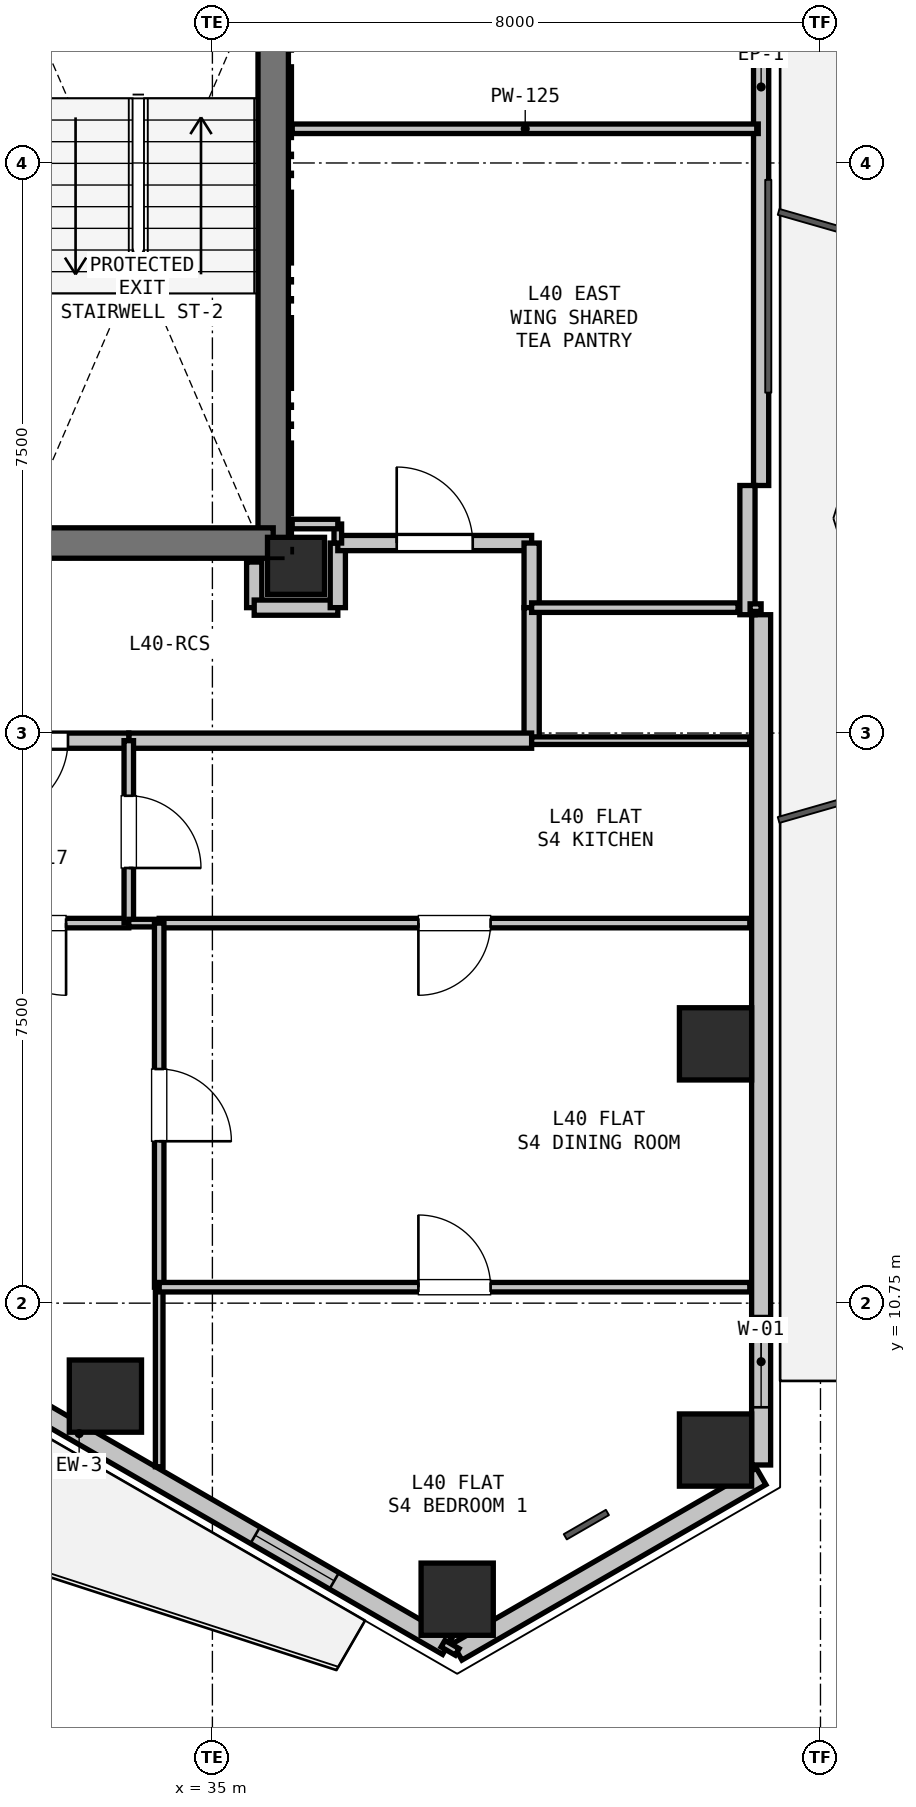
"""IFC4 building model, lengths in metres.
Left out: names, types, materials, properties, quantities, classifications, styles, units other than length and angle.
Written with IfcOpenShell. Run it as: python <this file> out.ifc"""

import sys

from ifc_helpers import new_model, si_unit, direction, frame, frame_2d, origin, origin_2d, place, context, subcontext, project, spatial, rectangle, hollow_rectangle, extrude, element, fill, save


model = new_model("IFC4")
c1 = context("Model", 3, precision=1e-05, world=origin(), true_north=direction((0.0, 1.0)))
c2 = subcontext(c1, "Body", "Model", "MODEL_VIEW")
j1 = project(units=[si_unit("LENGTHUNIT", "METRE"), si_unit("PLANEANGLEUNIT", "RADIAN")], contexts=[c1])
p1 = place(None, origin())
s1 = spatial("IfcSite", under=j1, at=p1, CompositionType="ELEMENT")
p2 = place(p1, origin())
s2 = spatial("IfcBuilding", under=s1, at=p2, CompositionType="ELEMENT")
p3 = place(p2, frame((0.0, 0.0, 144.3)))
s3 = spatial("IfcBuildingStorey", under=s2, at=p3, CompositionType="ELEMENT", Elevation=144.3)
p4 = place(p3, frame((36.1, 20.45, 0.0), z_axis=(0.0, 0.0, 1.0), x_axis=(1.0, 0.0, 0.0)))
e1 = element("IfcColumn", 1, at=p4, inside=s3, PredefinedType="COLUMN", context=c2, shape_type="SweptSolid", body=[
    extrude(rectangle(XDim=0.75, YDim=0.75, at=origin_2d()), origin(), (0.0, 0.0, 1.0), 3.3),
])
for number, where, z_axis, x_axis in (
    (2, (41.619, 14.161, 0.0), (0.0, 0.0, 1.0), (1.0, 0.0, 0.0)),
    (3, (41.619, 8.817, 0.0), (0.0, 0.0, 1.0), (1.0, 0.0, 0.0)),
    (4, (38.22, 6.855, 0.0), (0.0, 0.0, 1.0), (1.0, 0.0, 0.0)),
    (5, (33.593, 9.527, 0.0), (0.0, 0.0, 1.0), (1.0, 0.0, 0.0)),
):
    element("IfcColumn", number, at=place(p3, frame(where, z_axis=z_axis, x_axis=x_axis)), inside=s3, PredefinedType="COLUMN", context=c2, shape_type="SweptSolid", body=[
        extrude(hollow_rectangle(XDim=0.95, YDim=0.95, WallThickness=0.028, at=origin_2d()), origin(), (0.0, 0.0, 1.0), 3.3),
    ])
p5 = place(p3, frame((42.219, 8.471, 0.0), z_axis=(0.0, 0.0, 1.0), x_axis=(-0.866035021055, -0.499983342029, 0.0)))
e6 = element("IfcWall", 6, at=p5, inside=s3, PredefinedType="SOLIDWALL", context=c2, shape_type="SweptSolid", body=[
    extrude(rectangle(XDim=4.617, YDim=0.25, at=frame_2d((2.309, 0.0))), origin(), (0.0, 0.0, 1.0), 2.68),
])
p6 = place(p3, frame((42.219, 31.993, 0.0), z_axis=(0.0, 0.0, 1.0), x_axis=(0.0, -1.0, 0.0)))
e7 = element("IfcWall", 7, at=p6, inside=s3, PredefinedType="PARAPET", context=c2, shape_type="SweptSolid", body=[
    extrude(rectangle(XDim=10.486, YDim=0.2, at=frame_2d((5.243, 0.0))), origin(), (0.0, 0.0, 1.0), 0.2),
])
p7 = place(p3, frame((42.219, 19.807, 0.0), z_axis=(0.0, 0.0, 1.0), x_axis=(0.0, -1.0, 0.0)))
e8 = element("IfcWall", 8, at=p7, inside=s3, PredefinedType="SOLIDWALL", context=c2, shape_type="SweptSolid", body=[
    extrude(rectangle(XDim=11.186, YDim=0.25, at=frame_2d((5.593, 0.0))), origin(), (0.0, 0.0, 1.0), 2.68),
])
p8 = place(p7, frame((9.227, 0.0, 0.9)))
e9 = element("IfcOpeningElement", 9, at=p8, cuts=e8, PredefinedType="OPENING", context=c2, shape_type="SweptSolid", body=[
    extrude(rectangle(XDim=1.2, YDim=1.4, at=frame_2d((0.6, 0.7))), frame((0.0, 0.135, 0.0), z_axis=(0.0, -1.0, 0.0), x_axis=(1.0, 0.0, 0.0)), (0.0, 0.0, 1.0), 0.27),
])
p9 = place(p3, frame((42.039, 21.507, 0.0), z_axis=(0.0, 0.0, 1.0), x_axis=(0.0, -1.0, 0.0)))
e10 = element("IfcWall", 10, at=p9, inside=s3, PredefinedType="PARAPET", context=c2, shape_type="SweptSolid", body=[
    extrude(rectangle(XDim=1.7, YDim=0.2, at=frame_2d((0.85, 0.0))), origin(), (0.0, 0.0, 1.0), 2.68),
])
p10 = place(p3, frame((38.091, 6.237, 0.0), z_axis=(0.0, 0.0, 1.0), x_axis=(-0.86602239209, 0.500005216371, 0.0)))
e11 = element("IfcWall", 11, at=p10, inside=s3, PredefinedType="SOLIDWALL", context=c2, shape_type="SweptSolid", body=[
    extrude(rectangle(XDim=11.186, YDim=0.25, at=frame_2d((5.593, 0.0))), origin(), (0.0, 0.0, 1.0), 2.68),
])
p11 = place(p10, frame((7.095, 0.0, 0.0)))
e12 = element("IfcOpeningElement", 12, at=p11, cuts=e11, PredefinedType="OPENING", context=c2, shape_type="SweptSolid", body=[
    extrude(rectangle(XDim=1.0, YDim=2.1, at=frame_2d((0.5, 1.05))), frame((0.0, 0.135, 0.0), z_axis=(0.0, -1.0, 0.0), x_axis=(1.0, 0.0, 0.0)), (0.0, 0.0, 1.0), 0.27),
])
p12 = place(p10, frame((1.718, 0.0, 0.9)))
e13 = element("IfcOpeningElement", 13, at=p12, cuts=e11, PredefinedType="OPENING", context=c2, shape_type="SweptSolid", body=[
    extrude(rectangle(XDim=1.2, YDim=1.4, at=frame_2d((0.6, 0.7))), frame((0.0, 0.135, 0.0), z_axis=(0.0, -1.0, 0.0), x_axis=(1.0, 0.0, 0.0)), (0.0, 0.0, 1.0), 0.27),
])
p13 = place(p3, frame((35.8, 28.1, 0.0), z_axis=(0.0, 0.0, 1.0), x_axis=(0.0, -1.0, 0.0)))
e14 = element("IfcWall", 14, at=p13, inside=s3, PredefinedType="SHEAR", context=c2, shape_type="SweptSolid", body=[
    extrude(rectangle(XDim=7.35, YDim=0.4, at=frame_2d((3.675, 0.0))), origin(), (0.0, 0.0, 1.0), 3.06),
])
p14 = place(p3, frame((35.8, 20.75, 0.0), z_axis=(0.0, 0.0, 1.0), x_axis=(-1.0, 0.0, 0.0)))
e15 = element("IfcWall", 15, at=p14, inside=s3, PredefinedType="SHEAR", context=c2, shape_type="SweptSolid", body=[
    extrude(rectangle(XDim=3.45, YDim=0.4, at=frame_2d((1.725, 0.0))), origin(), (0.0, 0.0, 1.0), 3.06),
])
p15 = place(p3, frame((35.55, 20.5, 0.0), z_axis=(0.0, 0.0, 1.0), x_axis=(0.0, -1.0, 0.0)))
e16 = element("IfcWall", 16, at=p15, inside=s3, PredefinedType="PARTITIONING", context=c2, shape_type="SweptSolid", body=[
    extrude(rectangle(XDim=0.6, YDim=0.2, at=frame_2d((0.3, 0.0))), origin(), (0.0, 0.0, 1.0), 2.585),
])
p16 = place(p3, frame((35.55, 19.9, 0.0), z_axis=(0.0, 0.0, 1.0), x_axis=(1.0, 0.0, 0.0)))
e17 = element("IfcWall", 17, at=p16, inside=s3, PredefinedType="PARTITIONING", context=c2, shape_type="SweptSolid", body=[
    extrude(rectangle(XDim=1.1, YDim=0.2, at=frame_2d((0.55, 0.0))), origin(), (0.0, 0.0, 1.0), 2.433),
])
p17 = place(p3, frame((36.65, 19.9, 0.0), z_axis=(0.0, 0.0, 1.0), x_axis=(0.0, 1.0, 0.0)))
e18 = element("IfcWall", 18, at=p17, inside=s3, PredefinedType="PARTITIONING", context=c2, shape_type="SweptSolid", body=[
    extrude(rectangle(XDim=0.85, YDim=0.2, at=frame_2d((0.425, 0.0))), origin(), (0.0, 0.0, 1.0), 3.06),
])
p18 = place(p3, frame((36.65, 20.75, 0.0), z_axis=(0.0, 0.0, 1.0), x_axis=(1.0, 0.0, 0.0)))
e19 = element("IfcWall", 19, at=p18, inside=s3, PredefinedType="PARTITIONING", context=c2, shape_type="SweptSolid", body=[
    extrude(rectangle(XDim=2.55, YDim=0.2, at=frame_2d((1.275, 0.0))), origin(), (0.0, 0.0, 1.0), 3.06),
])
p19 = place(p18, frame((0.775, 0.0, 0.0)))
e20 = element("IfcOpeningElement", 20, at=p19, cuts=e19, PredefinedType="OPENING", context=c2, shape_type="SweptSolid", body=[
    extrude(rectangle(XDim=1.0, YDim=2.15, at=frame_2d((0.5, 1.075))), frame((0.0, 0.11, 0.0), z_axis=(0.0, -1.0, 0.0), x_axis=(1.0, 0.0, 0.0)), (0.0, 0.0, 1.0), 0.22),
])
p20 = place(p3, frame((39.2, 20.75, 0.0), z_axis=(0.0, 0.0, 1.0), x_axis=(0.0, -1.0, 0.0)))
e21 = element("IfcWall", 21, at=p20, inside=s3, PredefinedType="PARTITIONING", context=c2, shape_type="SweptSolid", body=[
    extrude(rectangle(XDim=0.85, YDim=0.2, at=frame_2d((0.425, 0.0))), origin(), (0.0, 0.0, 1.0), 3.06),
])
p21 = place(p3, frame((39.2, 19.9, 0.0), z_axis=(0.0, 0.0, 1.0), x_axis=(0.0, -1.0, 0.0)))
e22 = element("IfcWall", 22, at=p21, inside=s3, PredefinedType="PARTITIONING", context=c2, shape_type="SweptSolid", body=[
    extrude(rectangle(XDim=1.75, YDim=0.2, at=frame_2d((0.875, 0.0))), origin(), (0.0, 0.0, 1.0), 3.06),
])
p22 = place(p3, frame((39.2, 18.15, 0.0), z_axis=(0.0, 0.0, 1.0), x_axis=(-1.0, 0.0, 0.0)))
e23 = element("IfcWall", 23, at=p22, inside=s3, PredefinedType="PARTITIONING", context=c2, shape_type="SweptSolid", body=[
    extrude(rectangle(XDim=5.3, YDim=0.2, at=frame_2d((2.65, 0.0))), origin(), (0.0, 0.0, 1.0), 2.433),
])
p23 = place(p3, frame((33.9, 18.15, 0.0), z_axis=(0.0, 0.0, 1.0), x_axis=(-1.0, 0.0, 0.0)))
e24 = element("IfcWall", 24, at=p23, inside=s3, PredefinedType="PARTITIONING", context=c2, shape_type="SweptSolid", body=[
    extrude(rectangle(XDim=2.6, YDim=0.2, at=frame_2d((1.3, 0.0))), origin(), (0.0, 0.0, 1.0), 3.06),
])
p24 = place(p23, frame((0.8, 0.0, 0.0)))
e25 = element("IfcOpeningElement", 25, at=p24, cuts=e24, PredefinedType="OPENING", context=c2, shape_type="SweptSolid", body=[
    extrude(rectangle(XDim=1.0, YDim=2.15, at=frame_2d((0.5, 1.075))), frame((0.0, 0.11, 0.0), z_axis=(0.0, -1.0, 0.0), x_axis=(1.0, 0.0, 0.0)), (0.0, 0.0, 1.0), 0.22),
])
p25 = place(p3, frame((33.9, 15.75, 0.0), z_axis=(0.0, 0.0, 1.0), x_axis=(-1.0, 0.0, 0.0)))
e26 = element("IfcWall", 26, at=p25, inside=s3, PredefinedType="PARTITIONING", context=c2, shape_type="SweptSolid", body=[
    extrude(rectangle(XDim=2.6, YDim=0.125, at=frame_2d((1.3, 0.0))), origin(), (0.0, 0.0, 1.0), 3.06),
])
p26 = place(p25, frame((0.825, 0.0, 0.0)))
e27 = element("IfcOpeningElement", 27, at=p26, cuts=e26, PredefinedType="OPENING", context=c2, shape_type="SweptSolid", body=[
    extrude(rectangle(XDim=0.95, YDim=2.1, at=frame_2d((0.475, 1.05))), frame((0.0, 0.073, 0.0), z_axis=(0.0, -1.0, 0.0), x_axis=(1.0, 0.0, 0.0)), (0.0, 0.0, 1.0), 0.145),
])
p27 = place(p3, frame((33.9, 18.15, 0.0), z_axis=(0.0, 0.0, 1.0), x_axis=(0.0, -1.0, 0.0)))
e28 = element("IfcWall", 28, at=p27, inside=s3, PredefinedType="PARTITIONING", context=c2, shape_type="SweptSolid", body=[
    extrude(rectangle(XDim=2.4, YDim=0.125, at=frame_2d((1.2, 0.0))), origin(), (0.0, 0.0, 1.0), 3.06),
])
p28 = place(p27, frame((0.725, 0.0, 0.0)))
e29 = element("IfcOpeningElement", 29, at=p28, cuts=e28, PredefinedType="OPENING", context=c2, shape_type="SweptSolid", body=[
    extrude(rectangle(XDim=0.95, YDim=2.1, at=frame_2d((0.475, 1.05))), frame((0.0, 0.073, 0.0), z_axis=(0.0, -1.0, 0.0), x_axis=(1.0, 0.0, 0.0)), (0.0, 0.0, 1.0), 0.145),
])
p29 = place(p3, frame((39.2, 18.15, 0.0), z_axis=(0.0, 0.0, 1.0), x_axis=(1.0, 0.0, 0.0)))
e30 = element("IfcWall", 30, at=p29, inside=s3, PredefinedType="PARTITIONING", context=c2, shape_type="SweptSolid", body=[
    extrude(rectangle(XDim=2.87, YDim=0.1, at=frame_2d((1.435, 0.0))), origin(), (0.0, 0.0, 1.0), 2.365),
])
p30 = place(p3, frame((42.07, 15.75, 0.0), z_axis=(0.0, 0.0, 1.0), x_axis=(-1.0, 0.0, 0.0)))
e31 = element("IfcWall", 31, at=p30, inside=s3, PredefinedType="PARTITIONING", context=c2, shape_type="SweptSolid", body=[
    extrude(rectangle(XDim=7.77, YDim=0.125, at=frame_2d((3.885, 0.0))), origin(), (0.0, 0.0, 1.0), 2.365),
])
p31 = place(p30, frame((3.41, 0.0, 0.0)))
e32 = element("IfcOpeningElement", 32, at=p31, cuts=e31, PredefinedType="OPENING", context=c2, shape_type="SweptSolid", body=[
    extrude(rectangle(XDim=0.95, YDim=2.1, at=frame_2d((0.475, 1.05))), frame((0.0, 0.073, 0.0), z_axis=(0.0, -1.0, 0.0), x_axis=(1.0, 0.0, 0.0)), (0.0, 0.0, 1.0), 0.145),
])
p32 = place(p3, frame((34.3, 15.75, 0.0), z_axis=(0.0, 0.0, 1.0), x_axis=(-1.0, 0.0, 0.0)))
e33 = element("IfcWall", 33, at=p32, inside=s3, PredefinedType="PARTITIONING", context=c2, shape_type="SweptSolid", body=[
    extrude(rectangle(XDim=0.4, YDim=0.1, at=frame_2d((0.2, 0.0))), origin(), (0.0, 0.0, 1.0), 3.06),
])
p33 = place(p3, frame((42.181, 26.2, 0.0), z_axis=(0.0, 0.0, 1.0), x_axis=(-1.0, 0.0, 0.0)))
e34 = element("IfcWall", 34, at=p33, inside=s3, PredefinedType="PARTITIONING", context=c2, shape_type="SweptSolid", body=[
    extrude(rectangle(XDim=6.131, YDim=0.125, at=frame_2d((3.065, 0.0))), origin(), (0.0, 0.0, 1.0), 2.365),
])
p34 = place(p3, frame((36.65, 20.75, 0.0), z_axis=(0.0, 0.0, 1.0), x_axis=(0.0, 1.0, 0.0)))
e35 = element("IfcWall", 35, at=p34, inside=s3, PredefinedType="PARTITIONING", context=c2, shape_type="SweptSolid", body=[
    extrude(rectangle(XDim=0.25, YDim=0.1, at=frame_2d((0.125, 0.0))), origin(), (0.0, 0.0, 1.0), 3.06),
])
p35 = place(p3, frame((36.65, 21.0, 0.0), z_axis=(0.0, 0.0, 1.0), x_axis=(-1.0, 0.0, 0.0)))
e36 = element("IfcWall", 36, at=p35, inside=s3, PredefinedType="PARTITIONING", context=c2, shape_type="SweptSolid", body=[
    extrude(rectangle(XDim=0.6, YDim=0.125, at=frame_2d((0.3, 0.0))), origin(), (0.0, 0.0, 1.0), 2.585),
])
p36 = place(p3, frame((42.219, 19.9, 0.0), z_axis=(0.0, 0.0, 1.0), x_axis=(-1.0, 0.0, 0.0)))
e37 = element("IfcWall", 37, at=p36, inside=s3, PredefinedType="PARTITIONING", context=c2, shape_type="SweptSolid", body=[
    extrude(rectangle(XDim=0.145, YDim=0.1, at=frame_2d((0.072, 0.0))), origin(), (0.0, 0.0, 1.0), 3.06),
])
p37 = place(p3, frame((41.915, 19.9, 0.0), z_axis=(0.0, 0.0, 1.0), x_axis=(-1.0, 0.0, 0.0)))
e38 = element("IfcWall", 38, at=p37, inside=s3, PredefinedType="PARTITIONING", context=c2, shape_type="SweptSolid", body=[
    extrude(rectangle(XDim=2.715, YDim=0.125, at=frame_2d((1.358, 0.0))), origin(), (0.0, 0.0, 1.0), 2.365),
])
p38 = place(p3, frame((34.3, 15.75, 0.0), z_axis=(0.0, 0.0, 1.0), x_axis=(0.0, -1.0, 0.0)))
e39 = element("IfcWall", 39, at=p38, inside=s3, PredefinedType="PARTITIONING", context=c2, shape_type="SweptSolid", body=[
    extrude(rectangle(XDim=4.79, YDim=0.125, at=frame_2d((2.395, 0.0))), origin(), (0.0, 0.0, 1.0), 3.06),
])
p39 = place(p38, frame((1.92, 0.0, 0.0)))
e40 = element("IfcOpeningElement", 40, at=p39, cuts=e39, PredefinedType="OPENING", context=c2, shape_type="SweptSolid", body=[
    extrude(rectangle(XDim=0.95, YDim=2.1, at=frame_2d((0.475, 1.05))), frame((0.0, 0.073, 0.0), z_axis=(0.0, -1.0, 0.0), x_axis=(1.0, 0.0, 0.0)), (0.0, 0.0, 1.0), 0.145),
])
p40 = place(p3, frame((34.3, 10.96, 0.0), z_axis=(0.0, 0.0, 1.0), x_axis=(0.0, -1.0, 0.0)))
e41 = element("IfcWall", 41, at=p40, inside=s3, PredefinedType="PARTITIONING", context=c2, shape_type="SweptSolid", body=[
    extrude(rectangle(XDim=2.362, YDim=0.1, at=frame_2d((1.181, 0.0))), origin(), (0.0, 0.0, 1.0), 2.724),
])
p41 = place(p3, frame((34.3, 10.96, 0.0), z_axis=(0.0, 0.0, 1.0), x_axis=(1.0, 0.0, 0.0)))
e42 = element("IfcWall", 42, at=p41, inside=s3, PredefinedType="PARTITIONING", context=c2, shape_type="SweptSolid", body=[
    extrude(rectangle(XDim=7.77, YDim=0.125, at=frame_2d((3.885, 0.0))), origin(), (0.0, 0.0, 1.0), 2.433),
])
p42 = place(p41, frame((3.41, 0.0, 0.0)))
e43 = element("IfcOpeningElement", 43, at=p42, cuts=e42, PredefinedType="OPENING", context=c2, shape_type="SweptSolid", body=[
    extrude(rectangle(XDim=0.95, YDim=2.1, at=frame_2d((0.475, 1.05))), frame((0.0, 0.073, 0.0), z_axis=(0.0, -1.0, 0.0), x_axis=(1.0, 0.0, 0.0)), (0.0, 0.0, 1.0), 0.145),
])
p43 = place(p3, frame((38.221, 6.162, 0.0), z_axis=(0.0, 0.0, 1.0), x_axis=(-0.865581379588, 0.500768285049, 0.0)))
e44 = element("IfcWall", 44, at=p43, inside=s3, PredefinedType="PARTITIONING", context=c2, shape_type="SweptSolid", body=[
    extrude(rectangle(XDim=0.216, YDim=0.1, at=frame_2d((0.108, 0.0))), origin(), (0.0, 0.0, 1.0), 3.06),
])
p44 = place(p8, origin())
e45 = element("IfcWindow", 45, at=p44, inside=s3, PartitioningType="SINGLE_PANEL", PredefinedType="WINDOW", context=c2, shape_type="SweptSolid", body=[
    extrude(rectangle(XDim=1.2, YDim=1.4, at=frame_2d((0.6, 0.7))), frame((0.0, 0.03, 0.0), z_axis=(0.0, -1.0, 0.0), x_axis=(1.0, 0.0, 0.0)), (0.0, 0.0, 1.0), 0.06),
])
fill(e9, e45)
p45 = place(p12, origin())
e46 = element("IfcWindow", 46, at=p45, inside=s3, PartitioningType="SINGLE_PANEL", PredefinedType="WINDOW", context=c2, shape_type="SweptSolid", body=[
    extrude(rectangle(XDim=1.2, YDim=1.4, at=frame_2d((0.6, 0.7))), frame((0.0, 0.03, 0.0), z_axis=(0.0, -1.0, 0.0), x_axis=(1.0, 0.0, 0.0)), (0.0, 0.0, 1.0), 0.06),
])
fill(e13, e46)
p46 = place(p24, origin())
e47 = element("IfcDoor", 47, at=p46, inside=s3, OperationType="SINGLE_SWING_RIGHT", PredefinedType="DOOR", context=c2, shape_type="SweptSolid", body=[
    extrude(rectangle(XDim=1.0, YDim=2.15, at=frame_2d((0.5, 1.075))), frame((0.0, 0.025, 0.0), z_axis=(0.0, -1.0, 0.0), x_axis=(1.0, 0.0, 0.0)), (0.0, 0.0, 1.0), 0.05),
])
fill(e25, e47)
p47 = place(p19, origin())
e48 = element("IfcDoor", 48, at=p47, inside=s3, OperationType="SINGLE_SWING_LEFT", PredefinedType="DOOR", context=c2, shape_type="SweptSolid", body=[
    extrude(rectangle(XDim=1.0, YDim=2.15, at=frame_2d((0.5, 1.075))), frame((0.0, 0.025, 0.0), z_axis=(0.0, -1.0, 0.0), x_axis=(1.0, 0.0, 0.0)), (0.0, 0.0, 1.0), 0.05),
])
fill(e20, e48)
p48 = place(p28, origin())
e49 = element("IfcDoor", 49, at=p48, inside=s3, OperationType="SINGLE_SWING_RIGHT", PredefinedType="DOOR", context=c2, shape_type="SweptSolid", body=[
    extrude(rectangle(XDim=0.95, YDim=2.1, at=frame_2d((0.475, 1.05))), frame((0.0, 0.025, 0.0), z_axis=(0.0, -1.0, 0.0), x_axis=(1.0, 0.0, 0.0)), (0.0, 0.0, 1.0), 0.05),
])
fill(e29, e49)
p49 = place(p26, origin())
e50 = element("IfcDoor", 50, at=p49, inside=s3, OperationType="SINGLE_SWING_LEFT", PredefinedType="DOOR", context=c2, shape_type="SweptSolid", body=[
    extrude(rectangle(XDim=0.95, YDim=2.1, at=frame_2d((0.475, 1.05))), frame((0.0, 0.025, 0.0), z_axis=(0.0, -1.0, 0.0), x_axis=(1.0, 0.0, 0.0)), (0.0, 0.0, 1.0), 0.05),
])
fill(e27, e50)
p50 = place(p31, origin())
e51 = element("IfcDoor", 51, at=p50, inside=s3, OperationType="SINGLE_SWING_RIGHT", PredefinedType="DOOR", context=c2, shape_type="SweptSolid", body=[
    extrude(rectangle(XDim=0.95, YDim=2.1, at=frame_2d((0.475, 1.05))), frame((0.0, 0.025, 0.0), z_axis=(0.0, -1.0, 0.0), x_axis=(1.0, 0.0, 0.0)), (0.0, 0.0, 1.0), 0.05),
])
fill(e32, e51)
p51 = place(p39, origin())
e52 = element("IfcDoor", 52, at=p51, inside=s3, OperationType="SINGLE_SWING_RIGHT", PredefinedType="DOOR", context=c2, shape_type="SweptSolid", body=[
    extrude(rectangle(XDim=0.95, YDim=2.1, at=frame_2d((0.475, 1.05))), frame((0.0, 0.025, 0.0), z_axis=(0.0, -1.0, 0.0), x_axis=(1.0, 0.0, 0.0)), (0.0, 0.0, 1.0), 0.05),
])
fill(e40, e52)
p52 = place(p42, origin())
e53 = element("IfcDoor", 53, at=p52, inside=s3, OperationType="SINGLE_SWING_LEFT", PredefinedType="DOOR", context=c2, shape_type="SweptSolid", body=[
    extrude(rectangle(XDim=0.95, YDim=2.1, at=frame_2d((0.475, 1.05))), frame((0.0, 0.025, 0.0), z_axis=(0.0, -1.0, 0.0), x_axis=(1.0, 0.0, 0.0)), (0.0, 0.0, 1.0), 0.05),
])
fill(e43, e53)
save(model, sys.argv[1])
